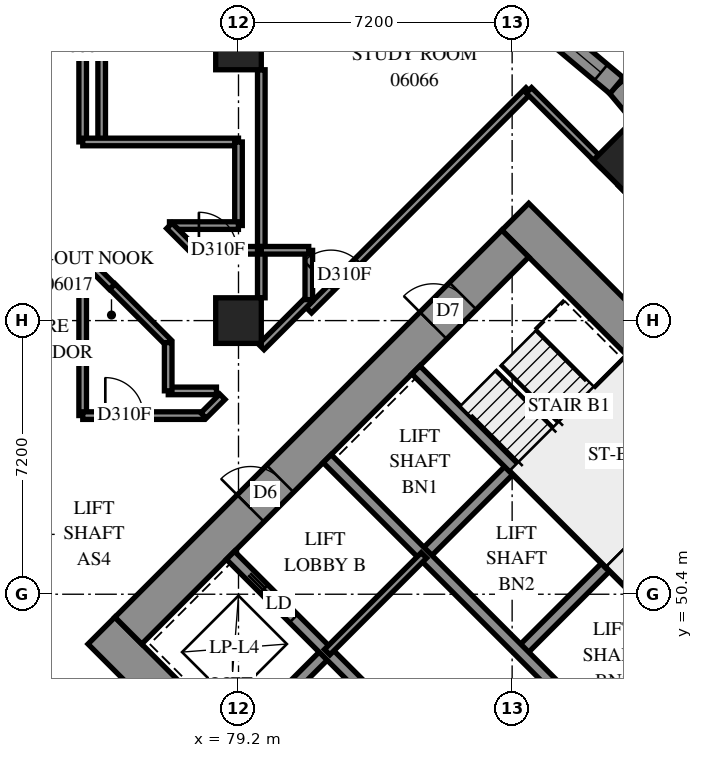
"""IFC4 building model, lengths in metres.
Left out: names, types, materials, properties, quantities, classifications, styles, units other than length and angle.
Written with IfcOpenShell. Run it as: python <this file> out.ifc"""

import sys

from ifc_helpers import new_model, si_unit, direction, frame, frame_2d, origin, origin_2d, place, context, subcontext, project, spatial, polyline, rectangle, outline, extrude, element, fill, save


model = new_model("IFC4")
c1 = context("Model", 3, precision=1e-05, world=origin(), true_north=direction((0.0, 1.0)))
c2 = subcontext(c1, "Body", "Model", "MODEL_VIEW")
j1 = project(units=[si_unit("LENGTHUNIT", "METRE"), si_unit("PLANEANGLEUNIT", "RADIAN")], contexts=[c1])
p1 = place(None, origin())
s1 = spatial("IfcSite", under=j1, at=p1, CompositionType="ELEMENT")
p2 = place(p1, origin())
s2 = spatial("IfcBuilding", under=s1, at=p2, CompositionType="ELEMENT")
p3 = place(p2, frame((0.0, 0.0, 27.0)))
s3 = spatial("IfcBuildingStorey", under=s2, at=p3, CompositionType="ELEMENT", Elevation=27.0)
for number, where, z_axis, x_axis in (
    (1, (79.2, 57.6, 0.0), (0.0, 0.0, 1.0), (1.0, 0.0, 0.0)),
    (2, (79.2, 64.8, 0.0), (0.0, 0.0, 1.0), (1.0, 0.0, 0.0)),
    (3, (89.382, 61.818, 0.0), (0.0, 0.0, 1.0), (0.707, -0.707, 0.0)),
):
    element("IfcColumn", number, at=place(p3, frame(where, z_axis=z_axis, x_axis=x_axis)), inside=s3, PredefinedType="COLUMN", context=c2, shape_type="SweptSolid", body=[
        extrude(rectangle(XDim=1.2, YDim=1.2, at=origin_2d()), origin(), (0.0, 0.0, 1.0), 3.1),
    ])
p4 = place(p3, frame((75.594, 49.443, -0.3), z_axis=(0.0, 0.0, 1.0), x_axis=(0.7071037324, -0.70710983, 0.0)))
e4 = element("IfcWall", 4, at=p4, inside=s3, PredefinedType="SHEAR", context=c2, shape_type="SweptSolid", body=[
    extrude(rectangle(XDim=16.4, YDim=1.0, at=frame_2d((8.2, 0.0))), origin(), (0.0, 0.0, 1.0), 2.7),
])
p5 = place(p3, frame((86.483, 60.333, -0.3), z_axis=(0.0, 0.0, 1.0), x_axis=(0.70710983, -0.7071037324, 0.0)))
e5 = element("IfcWall", 5, at=p5, inside=s3, PredefinedType="SHEAR", context=c2, shape_type="SweptSolid", body=[
    extrude(rectangle(XDim=16.4, YDim=1.0, at=frame_2d((8.2, 0.0))), origin(), (0.0, 0.0, 1.0), 2.7),
])
p6 = place(p5, frame((11.0, 0.0, 0.3)))
e6 = element("IfcOpeningElement", 6, at=p6, cuts=e5, PredefinedType="OPENING", context=c2, shape_type="SweptSolid", body=[
    extrude(rectangle(XDim=0.8, YDim=2.1, at=frame_2d((0.4, 1.05))), frame((0.0, 0.51, 0.0), z_axis=(0.0, -1.0, 0.0), x_axis=(1.0, 0.0, 0.0)), (0.0, 0.0, 1.0), 1.02),
])
p7 = place(p3, frame((76.301, 49.443, -0.3), z_axis=(0.0, 0.0, 1.0), x_axis=(0.7071067812, 0.7071067812, 0.0)))
e7 = element("IfcWall", 7, at=p7, inside=s3, PredefinedType="SHEAR", context=c2, shape_type="SweptSolid", body=[
    extrude(rectangle(XDim=14.4, YDim=1.0, at=frame_2d((7.2, 0.0))), origin(), (0.0, 0.0, 1.0), 2.7),
])
p8 = place(p7, frame((4.55, 0.0, 0.3)))
e8 = element("IfcOpeningElement", 8, at=p8, cuts=e7, PredefinedType="OPENING", context=c2, shape_type="SweptSolid", body=[
    extrude(rectangle(XDim=1.1, YDim=2.1, at=frame_2d((0.55, 1.05))), frame((0.0, 0.51, 0.0), z_axis=(0.0, -1.0, 0.0), x_axis=(1.0, 0.0, 0.0)), (0.0, 0.0, 1.0), 1.02),
])
p9 = place(p7, frame((11.35, 0.0, 0.3)))
e9 = element("IfcOpeningElement", 9, at=p9, cuts=e7, PredefinedType="OPENING", context=c2, shape_type="SweptSolid", body=[
    extrude(rectangle(XDim=1.1, YDim=2.1, at=frame_2d((0.55, 1.05))), frame((0.0, 0.51, 0.0), z_axis=(0.0, -1.0, 0.0), x_axis=(1.0, 0.0, 0.0)), (0.0, 0.0, 1.0), 1.02),
])
p10 = place(p3, frame((87.19, 38.554, -0.3), z_axis=(0.0, 0.0, 1.0), x_axis=(0.707103309, 0.7071102534, 0.0)))
e10 = element("IfcWall", 10, at=p10, inside=s3, PredefinedType="SHEAR", context=c2, shape_type="SweptSolid", body=[
    extrude(rectangle(XDim=14.4, YDim=1.0, at=frame_2d((7.2, 0.0))), origin(), (0.0, 0.0, 1.0), 2.7),
])
p11 = place(p10, frame((4.55, 0.0, 0.3)))
e11 = element("IfcOpeningElement", 11, at=p11, cuts=e10, PredefinedType="OPENING", context=c2, shape_type="SweptSolid", body=[
    extrude(rectangle(XDim=1.1, YDim=2.1, at=frame_2d((0.55, 1.05))), frame((0.0, 0.51, 0.0), z_axis=(0.0, -1.0, 0.0), x_axis=(1.0, 0.0, 0.0)), (0.0, 0.0, 1.0), 1.02),
])
p12 = place(p10, frame((11.35, 0.0, 0.3)))
e12 = element("IfcOpeningElement", 12, at=p12, cuts=e10, PredefinedType="OPENING", context=c2, shape_type="SweptSolid", body=[
    extrude(rectangle(XDim=1.1, YDim=2.1, at=frame_2d((0.55, 1.05))), frame((0.0, 0.51, 0.0), z_axis=(0.0, -1.0, 0.0), x_axis=(1.0, 0.0, 0.0)), (0.0, 0.0, 1.0), 1.02),
])
for number, where, z_axis, x_axis in (
    (13, (79.2, 46.544, 0.0), (0.0, 0.0, 1.0), (0.707, 0.707, 0.0)),
    (14, (84.079, 51.423, 0.0), (0.0, 0.0, 1.0), (0.707, 0.707, 0.0)),
):
    element("IfcWall", number, at=place(p3, frame(where, z_axis=z_axis, x_axis=x_axis)), inside=s3, PredefinedType="SOLIDWALL", context=c2, shape_type="SweptSolid", body=[
        extrude(rectangle(XDim=3.3, YDim=0.3, at=frame_2d((1.65, 0.0))), origin(), (0.0, 0.0, 1.0), 3.1),
    ])
for number, where, z_axis, x_axis in (
    (15, (86.625, 48.878, 0.0), (0.0, 0.0, 1.0), (0.707, 0.707, 0.0)),
    (16, (89.17, 46.332, 0.0), (0.0, 0.0, 1.0), (0.707, 0.707, 0.0)),
):
    element("IfcWall", number, at=place(p3, frame(where, z_axis=z_axis, x_axis=x_axis)), inside=s3, PredefinedType="SOLIDWALL", context=c2, shape_type="SweptSolid", body=[
        extrude(rectangle(XDim=3.3, YDim=0.3, at=frame_2d((1.65, 0.0))), origin(), (0.0, 0.0, 1.0), 3.1),
    ])
p13 = place(p3, frame((78.988, 51.423, 0.0), z_axis=(0.0, 0.0, 1.0), x_axis=(0.7071067812, -0.7071067812, 0.0)))
e17 = element("IfcWall", 17, at=p13, inside=s3, PredefinedType="SOLIDWALL", context=c2, shape_type="SweptSolid", body=[
    extrude(rectangle(XDim=14.4, YDim=0.3, at=frame_2d((7.2, 0.0))), origin(), (0.0, 0.0, 1.0), 3.1),
])
p14 = place(p13, frame((1.25, 0.0, 0.0)))
e18 = element("IfcOpeningElement", 18, at=p14, cuts=e17, PredefinedType="OPENING", context=c2, shape_type="SweptSolid", body=[
    extrude(rectangle(XDim=1.1, YDim=2.1, at=frame_2d((0.55, 1.05))), frame((0.0, 0.16, 0.0), z_axis=(0.0, -1.0, 0.0), x_axis=(1.0, 0.0, 0.0)), (0.0, 0.0, 1.0), 0.32),
])
p15 = place(p13, frame((4.85, 0.0, 0.0)))
e19 = element("IfcOpeningElement", 19, at=p15, cuts=e17, PredefinedType="OPENING", context=c2, shape_type="SweptSolid", body=[
    extrude(rectangle(XDim=1.1, YDim=2.1, at=frame_2d((0.55, 1.05))), frame((0.0, 0.16, 0.0), z_axis=(0.0, -1.0, 0.0), x_axis=(1.0, 0.0, 0.0)), (0.0, 0.0, 1.0), 0.32),
])
p16 = place(p13, frame((8.45, 0.0, 0.0)))
e20 = element("IfcOpeningElement", 20, at=p16, cuts=e17, PredefinedType="OPENING", context=c2, shape_type="SweptSolid", body=[
    extrude(rectangle(XDim=1.1, YDim=2.1, at=frame_2d((0.55, 1.05))), frame((0.0, 0.16, 0.0), z_axis=(0.0, -1.0, 0.0), x_axis=(1.0, 0.0, 0.0)), (0.0, 0.0, 1.0), 0.32),
])
p17 = place(p13, frame((12.05, 0.0, 0.0)))
e21 = element("IfcOpeningElement", 21, at=p17, cuts=e17, PredefinedType="OPENING", context=c2, shape_type="SweptSolid", body=[
    extrude(rectangle(XDim=1.1, YDim=2.1, at=frame_2d((0.55, 1.05))), frame((0.0, 0.16, 0.0), z_axis=(0.0, -1.0, 0.0), x_axis=(1.0, 0.0, 0.0)), (0.0, 0.0, 1.0), 0.32),
])
p18 = place(p3, frame((81.534, 53.969, 0.0), z_axis=(0.0, 0.0, 1.0), x_axis=(0.707103309, -0.7071102534, 0.0)))
e22 = element("IfcWall", 22, at=p18, inside=s3, PredefinedType="SOLIDWALL", context=c2, shape_type="SweptSolid", body=[
    extrude(rectangle(XDim=14.4, YDim=0.3, at=frame_2d((7.2, 0.0))), origin(), (0.0, 0.0, 1.0), 3.1),
])
p19 = place(p18, frame((12.05, 0.0, 0.0)))
e23 = element("IfcOpeningElement", 23, at=p19, cuts=e22, PredefinedType="OPENING", context=c2, shape_type="SweptSolid", body=[
    extrude(rectangle(XDim=1.1, YDim=2.1, at=frame_2d((0.55, 1.05))), frame((0.0, 0.16, 0.0), z_axis=(0.0, -1.0, 0.0), x_axis=(1.0, 0.0, 0.0)), (0.0, 0.0, 1.0), 0.32),
])
for number, where, z_axis, x_axis in (
    (24, (83.867, 56.302, 0.0), (0.0, 0.0, 1.0), (0.707, -0.707, 0.0)),
    (25, (88.958, 51.211, 0.0), (0.0, 0.0, 1.0), (0.707, -0.707, 0.0)),
):
    element("IfcWall", number, at=place(p3, frame(where, z_axis=z_axis, x_axis=x_axis)), inside=s3, PredefinedType="SOLIDWALL", context=c2, shape_type="SweptSolid", body=[
        extrude(rectangle(XDim=7.2, YDim=0.3, at=frame_2d((3.6, 0.0))), origin(), (0.0, 0.0, 1.0), 3.1),
    ])
p20 = place(p3, frame((88.958, 51.211, 0.0), z_axis=(0.0, 0.0, 1.0), x_axis=(0.7071067812, 0.7071067812, 0.0)))
e26 = element("IfcWall", 26, at=p20, inside=s3, PredefinedType="SOLIDWALL", context=c2, shape_type="SweptSolid", body=[
    extrude(rectangle(XDim=4.2, YDim=0.3, at=frame_2d((2.1, 0.0))), origin(), (0.0, 0.0, 1.0), 3.1),
])
p21 = place(p3, frame((91.363, 61.144, 0.0), z_axis=(0.0, 0.0, 1.0), x_axis=(-0.6428036801, 0.7660309582, 0.0)))
e27 = element("IfcWall", 27, at=p21, inside=s3, PredefinedType="SOLIDWALL", context=c2, shape_type="SweptSolid", body=[
    extrude(outline(polyline([(0.024, -0.275), (3.466, -0.275), (3.418, 0.275), (-0.024, 0.275), (0.024, -0.275)])), origin(), (0.0, 0.0, 1.0), 3.1),
])
p22 = place(p21, frame((0.442, 0.0, 0.5)))
e28 = element("IfcOpeningElement", 28, at=p22, cuts=e27, PredefinedType="OPENING", context=c2, shape_type="SweptSolid", body=[
    extrude(rectangle(XDim=1.2, YDim=2.45, at=frame_2d((0.6, 1.225))), frame((0.0, 0.285, 0.0), z_axis=(0.0, -1.0, 0.0), x_axis=(1.0, 0.0, 0.0)), (0.0, 0.0, 1.0), 0.57),
])
p23 = place(p3, frame((89.15, 63.781, 0.0), z_axis=(0.0, 0.0, 1.0), x_axis=(-0.7660309582, 0.6428036801, 0.0)))
e29 = element("IfcWall", 29, at=p23, inside=s3, PredefinedType="SOLIDWALL", context=c2, shape_type="SweptSolid", body=[
    extrude(outline(polyline([(-0.024, -0.275), (3.418, -0.275), (3.466, 0.275), (0.024, 0.275), (-0.024, -0.275)])), origin(), (0.0, 0.0, 1.0), 3.1),
])
p24 = place(p23, frame((0.54, 0.0, 0.5)))
e30 = element("IfcOpeningElement", 30, at=p24, cuts=e29, PredefinedType="OPENING", context=c2, shape_type="SweptSolid", body=[
    extrude(rectangle(XDim=1.2, YDim=2.45, at=frame_2d((0.6, 1.225))), frame((0.0, 0.285, 0.0), z_axis=(0.0, -1.0, 0.0), x_axis=(1.0, 0.0, 0.0)), (0.0, 0.0, 1.0), 0.57),
])
p25 = place(p3, frame((81.534, 48.878, 0.0), z_axis=(0.0, 0.0, 1.0), x_axis=(0.707092892, 0.7071206701, 0.0)))
e31 = element("IfcWall", 31, at=p25, inside=s3, PredefinedType="PARTITIONING", context=c2, shape_type="SweptSolid", body=[
    extrude(rectangle(XDim=3.6, YDim=0.2, at=frame_2d((1.8, 0.0))), origin(), (0.0, 0.0, 1.0), 3.1),
])
p26 = place(p3, frame((75.6, 62.3, 0.0), z_axis=(0.0, 0.0, 1.0), x_axis=(0.0, 1.0, 0.0)))
e32 = element("IfcWall", 32, at=p26, inside=s3, PredefinedType="PARTITIONING", context=c2, shape_type="SweptSolid", body=[
    extrude(rectangle(XDim=10.402, YDim=0.2, at=frame_2d((5.201, 0.0))), origin(), (0.0, 0.0, 1.0), 3.1),
])
p27 = place(p3, frame((81.052, 57.873, 0.0), z_axis=(0.0, 0.0, 1.0), x_axis=(0.7071067812, 0.7071067812, 0.0)))
e33 = element("IfcWall", 33, at=p27, inside=s3, PredefinedType="PARTITIONING", context=c2, shape_type="SweptSolid", body=[
    extrude(rectangle(XDim=8.18, YDim=0.2, at=frame_2d((4.09, 0.0))), origin(), (0.0, 0.0, 1.0), 3.1),
])
p28 = place(p27, frame((0.823, 0.0, 0.0)))
e34 = element("IfcOpeningElement", 34, at=p28, cuts=e33, PredefinedType="OPENING", context=c2, shape_type="SweptSolid", body=[
    extrude(rectangle(XDim=1.0, YDim=2.1, at=frame_2d((0.5, 1.05))), frame((0.0, 0.11, 0.0), z_axis=(0.0, -1.0, 0.0), x_axis=(1.0, 0.0, 0.0)), (0.0, 0.0, 1.0), 0.22),
])
p29 = place(p3, frame((89.271, 61.215, 0.0), z_axis=(0.0, 0.0, 1.0), x_axis=(0.7071067812, -0.7071067812, 0.0)))
e35 = element("IfcWall", 35, at=p29, inside=s3, PredefinedType="PARTITIONING", context=c2, shape_type="SweptSolid", body=[
    extrude(rectangle(XDim=6.505, YDim=0.2, at=frame_2d((3.253, 0.0))), origin(), (0.0, 0.0, 1.0), 3.1),
])
p30 = place(p3, frame((75.1, 62.302, 0.0), z_axis=(0.0, 0.0, 1.0), x_axis=(0.0, 1.0, 0.0)))
e36 = element("IfcWall", 36, at=p30, inside=s3, PredefinedType="PARTITIONING", context=c2, shape_type="SweptSolid", body=[
    extrude(rectangle(XDim=5.598, YDim=0.2, at=frame_2d((2.799, 0.0))), origin(), (0.0, 0.0, 1.0), 3.1),
])
p31 = place(p3, frame((79.8, 59.45, 0.0), z_axis=(0.0, 0.0, 1.0), x_axis=(0.0, 1.0, 0.0)))
e37 = element("IfcWall", 37, at=p31, inside=s3, PredefinedType="PARTITIONING", context=c2, shape_type="SweptSolid", body=[
    extrude(rectangle(XDim=4.75, YDim=0.2, at=frame_2d((2.375, 0.0))), origin(), (0.0, 0.0, 1.0), 3.1),
])
p32 = place(p3, frame((75.1, 55.102, 0.0), z_axis=(0.0, 0.0, 1.0), x_axis=(0.0, 1.0, 0.0)))
e38 = element("IfcWall", 38, at=p32, inside=s3, PredefinedType="PARTITIONING", context=c2, shape_type="SweptSolid", body=[
    extrude(rectangle(XDim=4.166, YDim=0.2, at=frame_2d((2.083, 0.0))), origin(), (0.0, 0.0, 1.0), 3.1),
])
p33 = place(p3, frame((75.102, 62.3, 0.0), z_axis=(0.0, 0.0, 1.0), x_axis=(1.0, 0.0, 0.0)))
e39 = element("IfcWall", 39, at=p33, inside=s3, PredefinedType="PARTITIONING", context=c2, shape_type="SweptSolid", body=[
    extrude(rectangle(XDim=4.098, YDim=0.2, at=frame_2d((2.049, 0.0))), origin(), (0.0, 0.0, 1.0), 3.1),
])
p34 = place(p3, frame((75.102, 55.1, 0.0), z_axis=(0.0, 0.0, 1.0), x_axis=(1.0, 0.0, 0.0)))
e40 = element("IfcWall", 40, at=p34, inside=s3, PredefinedType="PARTITIONING", context=c2, shape_type="SweptSolid", body=[
    extrude(rectangle(XDim=3.178, YDim=0.2, at=frame_2d((1.589, 0.0))), origin(), (0.0, 0.0, 1.0), 3.1),
])
p35 = place(p34, frame((0.594, 0.0, 0.0)))
e41 = element("IfcOpeningElement", 41, at=p35, cuts=e40, PredefinedType="OPENING", context=c2, shape_type="SweptSolid", body=[
    extrude(rectangle(XDim=1.0, YDim=2.1, at=frame_2d((0.5, 1.05))), frame((0.0, 0.11, 0.0), z_axis=(0.0, -1.0, 0.0), x_axis=(1.0, 0.0, 0.0)), (0.0, 0.0, 1.0), 0.22),
])
p36 = place(p3, frame((86.841, 63.659, 0.0), z_axis=(0.0, 0.0, 1.0), x_axis=(0.7067795096, -0.7074339014, 0.0)))
e42 = element("IfcWall", 42, at=p36, inside=s3, PredefinedType="PARTITIONING", context=c2, shape_type="SweptSolid", body=[
    extrude(rectangle(XDim=2.751, YDim=0.2, at=frame_2d((1.375, 0.0))), origin(), (0.0, 0.0, 1.0), 3.1),
])
p37 = place(p3, frame((79.2, 60.102, 0.0), z_axis=(0.0, 0.0, 1.0), x_axis=(0.0, 1.0, 0.0)))
e43 = element("IfcWall", 43, at=p37, inside=s3, PredefinedType="PARTITIONING", context=c2, shape_type="SweptSolid", body=[
    extrude(rectangle(XDim=2.198, YDim=0.2, at=frame_2d((1.099, 0.0))), origin(), (0.0, 0.0, 1.0), 3.1),
])
p38 = place(p3, frame((75.879, 58.497, 0.0), z_axis=(0.0, 0.0, 1.0), x_axis=(0.7075866635, -0.706626573, 0.0)))
e44 = element("IfcWall", 44, at=p38, inside=s3, PredefinedType="PARTITIONING", context=c2, shape_type="SweptSolid", body=[
    extrude(rectangle(XDim=2.083, YDim=0.2, at=frame_2d((1.042, 0.0))), origin(), (0.0, 0.0, 1.0), 3.1),
])
p39 = place(p3, frame((77.384, 60.1, 0.0), z_axis=(0.0, 0.0, 1.0), x_axis=(1.0, 0.0, 0.0)))
e45 = element("IfcWall", 45, at=p39, inside=s3, PredefinedType="PARTITIONING", context=c2, shape_type="SweptSolid", body=[
    extrude(rectangle(XDim=1.814, YDim=0.2, at=frame_2d((0.907, 0.0))), origin(), (0.0, 0.0, 1.0), 3.1),
])
p40 = place(p3, frame((78.032, 59.45, 0.0), z_axis=(0.0, 0.0, 1.0), x_axis=(1.0, 0.0, 0.0)))
e46 = element("IfcWall", 46, at=p40, inside=s3, PredefinedType="PARTITIONING", context=c2, shape_type="SweptSolid", body=[
    extrude(rectangle(XDim=1.768, YDim=0.2, at=frame_2d((0.884, 0.0))), origin(), (0.0, 0.0, 1.0), 3.1),
])
p41 = place(p40, frame((0.126, 0.0, 0.0)))
e47 = element("IfcOpeningElement", 47, at=p41, cuts=e46, PredefinedType="OPENING", context=c2, shape_type="SweptSolid", body=[
    extrude(rectangle(XDim=1.0, YDim=2.1, at=frame_2d((0.5, 1.05))), frame((0.0, 0.11, 0.0), z_axis=(0.0, -1.0, 0.0), x_axis=(1.0, 0.0, 0.0)), (0.0, 0.0, 1.0), 0.22),
])
p42 = place(p3, frame((79.801, 56.905, 0.0), z_axis=(0.0, 0.0, 1.0), x_axis=(0.7071067812, 0.7071067812, 0.0)))
e48 = element("IfcWall", 48, at=p42, inside=s3, PredefinedType="PARTITIONING", context=c2, shape_type="SweptSolid", body=[
    extrude(rectangle(XDim=1.765, YDim=0.2, at=frame_2d((0.882, 0.0))), origin(), (0.0, 0.0, 1.0), 3.1),
])
p43 = place(p3, frame((81.05, 58.152, 0.0), z_axis=(0.0, 0.0, 1.0), x_axis=(0.0, 1.0, 0.0)))
e49 = element("IfcWall", 49, at=p43, inside=s3, PredefinedType="PARTITIONING", context=c2, shape_type="SweptSolid", body=[
    extrude(rectangle(XDim=1.296, YDim=0.2, at=frame_2d((0.648, 0.0))), origin(), (0.0, 0.0, 1.0), 3.1),
])
for number, where, z_axis, x_axis in (
    (50, (77.352, 55.75, 0.0), (0.0, 0.0, 1.0), (1.0, 0.0, 0.0)),
    (51, (77.35, 55.752, 0.0), (0.0, 0.0, 1.0), (0.0, 1.0, 0.0)),
):
    element("IfcWall", number, at=place(p3, frame(where, z_axis=z_axis, x_axis=x_axis)), inside=s3, PredefinedType="PARTITIONING", context=c2, shape_type="SweptSolid", body=[
        extrude(rectangle(XDim=1.268, YDim=0.2, at=frame_2d((0.634, 0.0))), origin(), (0.0, 0.0, 1.0), 3.1),
    ])
p44 = place(p3, frame((79.8, 58.2, 0.0), z_axis=(0.0, 0.0, 1.0), x_axis=(0.0, 1.0, 0.0)))
e52 = element("IfcWall", 52, at=p44, inside=s3, PredefinedType="PARTITIONING", context=c2, shape_type="SweptSolid", body=[
    extrude(rectangle(XDim=1.25, YDim=0.2, at=frame_2d((0.625, 0.0))), origin(), (0.0, 0.0, 1.0), 3.1),
])
p45 = place(p3, frame((79.8, 59.45, 0.0), z_axis=(0.0, 0.0, 1.0), x_axis=(1.0, 0.0, 0.0)))
e53 = element("IfcWall", 53, at=p45, inside=s3, PredefinedType="PARTITIONING", context=c2, shape_type="SweptSolid", body=[
    extrude(rectangle(XDim=1.248, YDim=0.2, at=frame_2d((0.624, 0.0))), origin(), (0.0, 0.0, 1.0), 3.1),
])
p46 = place(p3, frame((77.381, 60.095, 0.0), z_axis=(0.0, 0.0, 1.0), x_axis=(0.7071067812, -0.7071067812, 0.0)))
e54 = element("IfcWall", 54, at=p46, inside=s3, PredefinedType="PARTITIONING", context=c2, shape_type="SweptSolid", body=[
    extrude(rectangle(XDim=0.916, YDim=0.2, at=frame_2d((0.458, 0.0))), origin(), (0.0, 0.0, 1.0), 3.1),
])
p47 = place(p3, frame((75.297, 59.067, 0.0), z_axis=(0.0, 0.0, 1.0), x_axis=(0.7071067812, -0.7071067812, 0.0)))
e55 = element("IfcWall", 55, at=p47, inside=s3, PredefinedType="PARTITIONING", context=c2, shape_type="SweptSolid", body=[
    extrude(rectangle(XDim=0.815, YDim=0.2, at=frame_2d((0.407, 0.0))), origin(), (0.0, 0.0, 1.0), 3.1),
])
p48 = place(p3, frame((78.279, 55.1, 0.0), z_axis=(0.0, 0.0, 1.0), x_axis=(0.7071067812, 0.7071067812, 0.0)))
e56 = element("IfcWall", 56, at=p48, inside=s3, PredefinedType="PARTITIONING", context=c2, shape_type="SweptSolid", body=[
    extrude(rectangle(XDim=0.701, YDim=0.2, at=frame_2d((0.351, 0.0))), origin(), (0.0, 0.0, 1.0), 3.1),
])
p49 = place(p24, origin())
e57 = element("IfcWindow", 57, at=p49, inside=s3, PartitioningType="SINGLE_PANEL", PredefinedType="WINDOW", context=c2, shape_type="SweptSolid", body=[
    extrude(rectangle(XDim=1.2, YDim=2.45, at=frame_2d((0.6, 1.225))), frame((0.0, 0.155, 0.0), z_axis=(0.0, -1.0, 0.0), x_axis=(1.0, 0.0, 0.0)), (0.0, 0.0, 1.0), 0.06),
])
fill(e30, e57)
p50 = place(p8, origin())
e58 = element("IfcDoor", 58, at=p50, inside=s3, OperationType="DOUBLE_DOOR_SINGLE_SWING", PredefinedType="DOOR", context=c2, shape_type="SweptSolid", body=[
    extrude(rectangle(XDim=1.1, YDim=2.1, at=frame_2d((0.55, 1.05))), frame((0.0, 0.025, 0.0), z_axis=(0.0, -1.0, 0.0), x_axis=(1.0, 0.0, 0.0)), (0.0, 0.0, 1.0), 0.05),
])
fill(e8, e58)
p51 = place(p9, origin())
e59 = element("IfcDoor", 59, at=p51, inside=s3, OperationType="SINGLE_SWING_LEFT", PredefinedType="DOOR", context=c2, shape_type="SweptSolid", body=[
    extrude(rectangle(XDim=1.1, YDim=2.1, at=frame_2d((0.55, 1.05))), frame((0.0, 0.025, 0.0), z_axis=(0.0, -1.0, 0.0), x_axis=(1.0, 0.0, 0.0)), (0.0, 0.0, 1.0), 0.05),
])
fill(e9, e59)
p52 = place(p14, origin())
e60 = element("IfcDoor", 60, at=p52, inside=s3, OperationType="SLIDING_TO_LEFT", PredefinedType="DOOR", context=c2, shape_type="SweptSolid", body=[
    extrude(rectangle(XDim=1.1, YDim=2.1, at=frame_2d((0.55, 1.05))), frame((0.0, 0.025, 0.0), z_axis=(0.0, -1.0, 0.0), x_axis=(1.0, 0.0, 0.0)), (0.0, 0.0, 1.0), 0.05),
])
fill(e18, e60)
p53 = place(p35, origin())
e61 = element("IfcDoor", 61, at=p53, inside=s3, OperationType="SINGLE_SWING_LEFT", PredefinedType="DOOR", context=c2, shape_type="SweptSolid", body=[
    extrude(rectangle(XDim=1.0, YDim=2.1, at=frame_2d((0.5, 1.05))), frame((0.0, 0.025, 0.0), z_axis=(0.0, -1.0, 0.0), x_axis=(1.0, 0.0, 0.0)), (0.0, 0.0, 1.0), 0.05),
])
fill(e41, e61)
p54 = place(p41, origin())
e62 = element("IfcDoor", 62, at=p54, inside=s3, OperationType="SINGLE_SWING_LEFT", PredefinedType="DOOR", context=c2, shape_type="SweptSolid", body=[
    extrude(rectangle(XDim=1.0, YDim=2.1, at=frame_2d((0.5, 1.05))), frame((0.0, 0.025, 0.0), z_axis=(0.0, -1.0, 0.0), x_axis=(1.0, 0.0, 0.0)), (0.0, 0.0, 1.0), 0.05),
])
fill(e47, e62)
p55 = place(p28, origin())
e63 = element("IfcDoor", 63, at=p55, inside=s3, OperationType="SINGLE_SWING_RIGHT", PredefinedType="DOOR", context=c2, shape_type="SweptSolid", body=[
    extrude(rectangle(XDim=1.0, YDim=2.1, at=frame_2d((0.5, 1.05))), frame((0.0, 0.025, 0.0), z_axis=(0.0, -1.0, 0.0), x_axis=(1.0, 0.0, 0.0)), (0.0, 0.0, 1.0), 0.05),
])
fill(e34, e63)
save(model, sys.argv[1])
